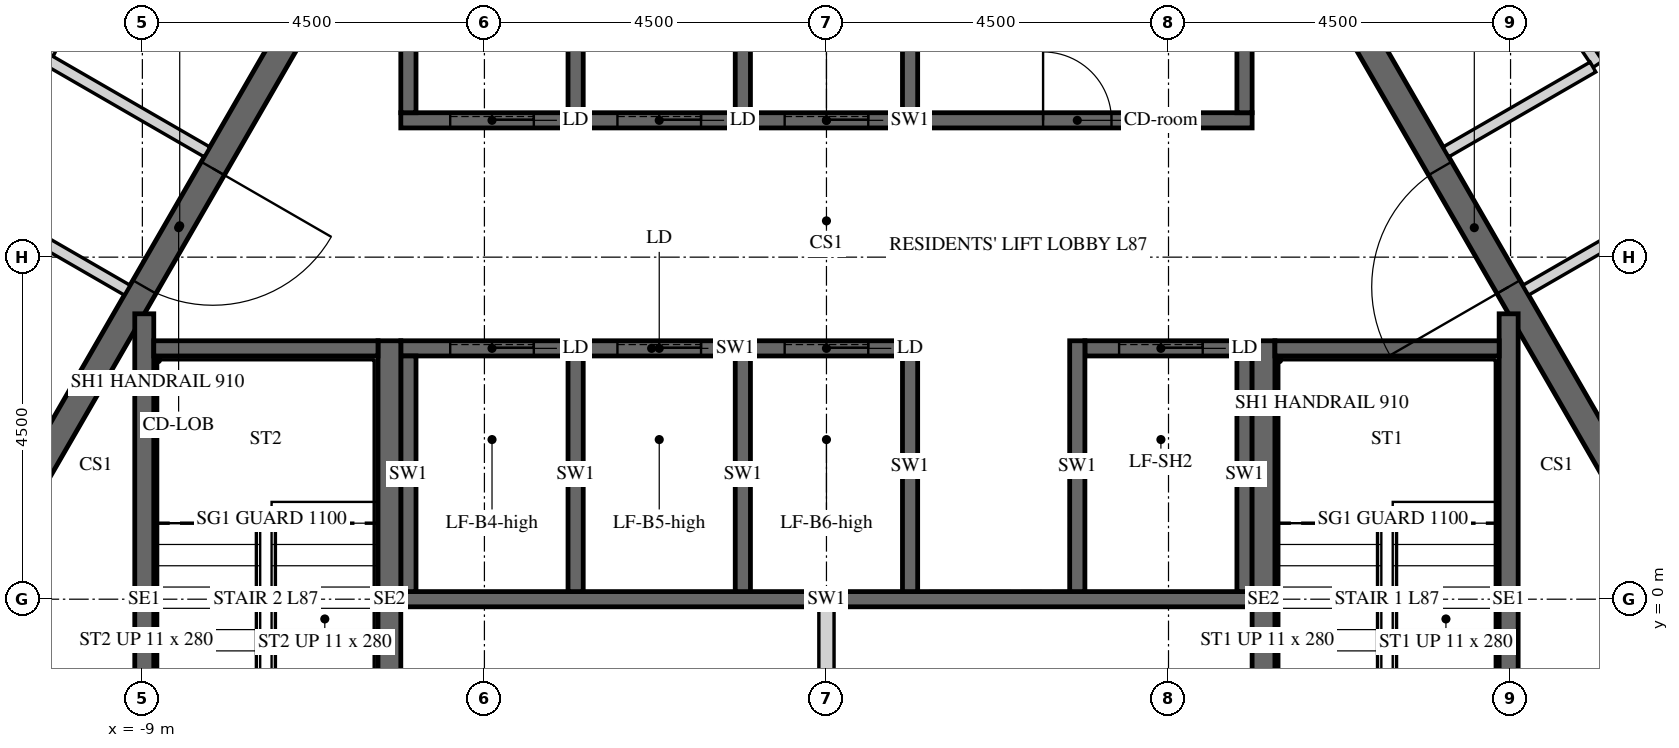
"""IFC4 building model, lengths in metres.
Left out: names, types, materials, properties, quantities, classifications, styles, units other than length and angle.
Written with IfcOpenShell. Run it as: python <this file> out.ifc"""

import sys

from ifc_helpers import new_model, si_unit, direction, frame, frame_2d, origin, place, context, subcontext, project, spatial, polyline, rectangle, outline, extrude, element, fill, save


model = new_model("IFC4")
c1 = context("Model", 3, precision=1e-05, world=origin(), true_north=direction((0.0, 1.0)))
c2 = subcontext(c1, "Body", "Model", "MODEL_VIEW")
j1 = project(units=[si_unit("LENGTHUNIT", "METRE"), si_unit("PLANEANGLEUNIT", "RADIAN")], contexts=[c1])
p1 = place(None, origin())
s1 = spatial("IfcSite", under=j1, at=p1, CompositionType="ELEMENT")
p2 = place(p1, origin())
s2 = spatial("IfcBuilding", under=s1, at=p2, CompositionType="ELEMENT")
p3 = place(p2, frame((0.0, 0.0, 361.2)))
s3 = spatial("IfcBuildingStorey", under=s2, at=p3, CompositionType="ELEMENT", Elevation=361.2)
p4 = place(p3, frame((-5.673, 9.825, -0.15), z_axis=(0.0, 0.0, 1.0), x_axis=(-0.499995046907, -0.866028263435, 0.0)))
e1 = element("IfcWall", 1, at=p4, inside=s3, PredefinedType="SHEAR", context=c2, shape_type="SweptSolid", body=[
    extrude(outline(polyline([(-0.101, -0.175), (11.446, -0.175), (11.244, 0.175), (0.101, 0.175), (-0.101, -0.175)])), origin(), (0.0, 0.0, 1.0), 3.9),
])
p5 = place(p4, frame((4.801, 0.0, 0.15)))
e2 = element("IfcOpeningElement", 2, at=p5, cuts=e1, PredefinedType="OPENING", context=c2, shape_type="SweptSolid", body=[
    extrude(rectangle(XDim=1.8, YDim=2.4, at=frame_2d((0.9, 1.2))), frame((0.0, 0.185, 0.0), z_axis=(0.0, -1.0, 0.0), x_axis=(1.0, 0.0, 0.0)), (0.0, 0.0, 1.0), 0.37),
])
p6 = place(p3, frame((-11.345, 0.0, -0.15), z_axis=(0.0, 0.0, 1.0), x_axis=(0.499995046907, -0.866028263435, 0.0)))
e3 = element("IfcWall", 3, at=p6, inside=s3, PredefinedType="SHEAR", context=c2, shape_type="SweptSolid", body=[
    extrude(outline(polyline([(-0.101, -0.175), (11.446, -0.175), (11.244, 0.175), (0.101, 0.175), (-0.101, -0.175)])), origin(), (0.0, 0.0, 1.0), 3.9),
])
p7 = place(p6, frame((4.744, 0.0, 0.15)))
e4 = element("IfcOpeningElement", 4, at=p7, cuts=e3, PredefinedType="OPENING", context=c2, shape_type="SweptSolid", body=[
    extrude(rectangle(XDim=1.8, YDim=2.4, at=frame_2d((0.9, 1.2))), frame((0.0, 0.185, 0.0), z_axis=(0.0, -1.0, 0.0), x_axis=(1.0, 0.0, 0.0)), (0.0, 0.0, 1.0), 0.37),
])
p8 = place(p3, frame((5.673, -9.825, -0.15), z_axis=(0.0, 0.0, 1.0), x_axis=(0.499995046907, 0.866028263435, 0.0)))
e5 = element("IfcWall", 5, at=p8, inside=s3, PredefinedType="SHEAR", context=c2, shape_type="SweptSolid", body=[
    extrude(outline(polyline([(-0.101, -0.175), (11.446, -0.175), (11.244, 0.175), (0.101, 0.175), (-0.101, -0.175)])), origin(), (0.0, 0.0, 1.0), 3.9),
])
p9 = place(p8, frame((4.801, 0.0, 0.15)))
e6 = element("IfcOpeningElement", 6, at=p9, cuts=e5, PredefinedType="OPENING", context=c2, shape_type="SweptSolid", body=[
    extrude(rectangle(XDim=1.8, YDim=2.4, at=frame_2d((0.9, 1.2))), frame((0.0, 0.185, 0.0), z_axis=(0.0, -1.0, 0.0), x_axis=(1.0, 0.0, 0.0)), (0.0, 0.0, 1.0), 0.37),
])
p10 = place(p3, frame((11.345, 0.0, -0.15), z_axis=(0.0, 0.0, 1.0), x_axis=(-0.499995046907, 0.866028263435, 0.0)))
e7 = element("IfcWall", 7, at=p10, inside=s3, PredefinedType="SHEAR", context=c2, shape_type="SweptSolid", body=[
    extrude(outline(polyline([(-0.101, -0.175), (11.446, -0.175), (11.244, 0.175), (0.101, 0.175), (-0.101, -0.175)])), origin(), (0.0, 0.0, 1.0), 3.9),
])
p11 = place(p10, frame((4.744, 0.0, 0.15)))
e8 = element("IfcOpeningElement", 8, at=p11, cuts=e7, PredefinedType="OPENING", context=c2, shape_type="SweptSolid", body=[
    extrude(rectangle(XDim=1.8, YDim=2.4, at=frame_2d((0.9, 1.2))), frame((0.0, 0.185, 0.0), z_axis=(0.0, -1.0, 0.0), x_axis=(1.0, 0.0, 0.0)), (0.0, 0.0, 1.0), 0.37),
])
p12 = place(p3, frame((-5.6, 6.3, -0.25), z_axis=(0.0, 0.0, 1.0), x_axis=(1.0, 0.0, 0.0)))
e9 = element("IfcWall", 9, at=p12, inside=s3, PredefinedType="SHEAR", context=c2, shape_type="SweptSolid", body=[
    extrude(rectangle(XDim=11.2, YDim=0.2, at=frame_2d((5.6, 0.0))), origin(), (0.0, 0.0, 1.0), 3.9),
])
p13 = place(p12, frame((8.45, 0.0, 0.25)))
e10 = element("IfcOpeningElement", 10, at=p13, cuts=e9, PredefinedType="OPENING", context=c2, shape_type="SweptSolid", body=[
    extrude(rectangle(XDim=0.9, YDim=2.1, at=frame_2d((0.45, 1.05))), frame((0.0, 0.11, 0.0), z_axis=(0.0, -1.0, 0.0), x_axis=(1.0, 0.0, 0.0)), (0.0, 0.0, 1.0), 0.22),
])
p14 = place(p12, frame((0.65, 0.0, 0.25)))
e11 = element("IfcOpeningElement", 11, at=p14, cuts=e9, PredefinedType="OPENING", context=c2, shape_type="SweptSolid", body=[
    extrude(rectangle(XDim=1.1, YDim=2.1, at=frame_2d((0.55, 1.05))), frame((0.0, 0.11, 0.0), z_axis=(0.0, -1.0, 0.0), x_axis=(1.0, 0.0, 0.0)), (0.0, 0.0, 1.0), 0.22),
])
p15 = place(p12, frame((2.85, 0.0, 0.25)))
e12 = element("IfcOpeningElement", 12, at=p15, cuts=e9, PredefinedType="OPENING", context=c2, shape_type="SweptSolid", body=[
    extrude(rectangle(XDim=1.1, YDim=2.1, at=frame_2d((0.55, 1.05))), frame((0.0, 0.11, 0.0), z_axis=(0.0, -1.0, 0.0), x_axis=(1.0, 0.0, 0.0)), (0.0, 0.0, 1.0), 0.22),
])
p16 = place(p12, frame((5.05, 0.0, 0.25)))
e13 = element("IfcOpeningElement", 13, at=p16, cuts=e9, PredefinedType="OPENING", context=c2, shape_type="SweptSolid", body=[
    extrude(rectangle(XDim=1.1, YDim=2.1, at=frame_2d((0.55, 1.05))), frame((0.0, 0.11, 0.0), z_axis=(0.0, -1.0, 0.0), x_axis=(1.0, 0.0, 0.0)), (0.0, 0.0, 1.0), 0.22),
])
for number, where, z_axis, x_axis in (
    (14, (-5.5, 6.4, -0.25), (0.0, 0.0, 1.0), (0.0, 1.0, 0.0)),
    (15, (-3.3, 6.4, -0.25), (0.0, 0.0, 1.0), (0.0, 1.0, 0.0)),
    (16, (-1.1, 6.4, -0.25), (0.0, 0.0, 1.0), (0.0, 1.0, 0.0)),
    (17, (1.1, 6.4, -0.25), (0.0, 0.0, 1.0), (0.0, 1.0, 0.0)),
    (18, (5.5, 6.4, -0.25), (0.0, 0.0, 1.0), (0.0, 1.0, 0.0)),
):
    element("IfcWall", number, at=place(p3, frame(where, z_axis=z_axis, x_axis=x_axis)), inside=s3, PredefinedType="SHEAR", context=c2, shape_type="SweptSolid", body=[
        extrude(rectangle(XDim=2.9, YDim=0.2, at=frame_2d((1.45, 0.0))), origin(), (0.0, 0.0, 1.0), 3.9),
    ])
p17 = place(p3, frame((-5.6, 3.3, -0.25), z_axis=(0.0, 0.0, 1.0), x_axis=(1.0, 0.0, 0.0)))
e19 = element("IfcWall", 19, at=p17, inside=s3, PredefinedType="SHEAR", context=c2, shape_type="SweptSolid", body=[
    extrude(rectangle(XDim=6.6, YDim=0.2, at=frame_2d((3.3, 0.0))), origin(), (0.0, 0.0, 1.0), 3.9),
])
p18 = place(p17, frame((0.65, 0.0, 0.25)))
e20 = element("IfcOpeningElement", 20, at=p18, cuts=e19, PredefinedType="OPENING", context=c2, shape_type="SweptSolid", body=[
    extrude(rectangle(XDim=1.1, YDim=2.1, at=frame_2d((0.55, 1.05))), frame((0.0, 0.11, 0.0), z_axis=(0.0, -1.0, 0.0), x_axis=(1.0, 0.0, 0.0)), (0.0, 0.0, 1.0), 0.22),
])
p19 = place(p17, frame((2.85, 0.0, 0.25)))
e21 = element("IfcOpeningElement", 21, at=p19, cuts=e19, PredefinedType="OPENING", context=c2, shape_type="SweptSolid", body=[
    extrude(rectangle(XDim=1.1, YDim=2.1, at=frame_2d((0.55, 1.05))), frame((0.0, 0.11, 0.0), z_axis=(0.0, -1.0, 0.0), x_axis=(1.0, 0.0, 0.0)), (0.0, 0.0, 1.0), 0.22),
])
p20 = place(p17, frame((5.05, 0.0, 0.25)))
e22 = element("IfcOpeningElement", 22, at=p20, cuts=e19, PredefinedType="OPENING", context=c2, shape_type="SweptSolid", body=[
    extrude(rectangle(XDim=1.1, YDim=2.1, at=frame_2d((0.55, 1.05))), frame((0.0, 0.11, 0.0), z_axis=(0.0, -1.0, 0.0), x_axis=(1.0, 0.0, 0.0)), (0.0, 0.0, 1.0), 0.22),
])
p21 = place(p3, frame((3.4, 3.3, -0.25), z_axis=(0.0, 0.0, 1.0), x_axis=(1.0, 0.0, 0.0)))
e23 = element("IfcWall", 23, at=p21, inside=s3, PredefinedType="SHEAR", context=c2, shape_type="SweptSolid", body=[
    extrude(rectangle(XDim=2.2, YDim=0.2, at=frame_2d((1.1, 0.0))), origin(), (0.0, 0.0, 1.0), 3.9),
])
p22 = place(p21, frame((0.45, 0.0, 0.25)))
e24 = element("IfcOpeningElement", 24, at=p22, cuts=e23, PredefinedType="OPENING", context=c2, shape_type="SweptSolid", body=[
    extrude(rectangle(XDim=1.1, YDim=2.1, at=frame_2d((0.55, 1.05))), frame((0.0, 0.11, 0.0), z_axis=(0.0, -1.0, 0.0), x_axis=(1.0, 0.0, 0.0)), (0.0, 0.0, 1.0), 0.22),
])
p23 = place(p3, frame((-5.6, 0.0, -0.25), z_axis=(0.0, 0.0, 1.0), x_axis=(1.0, 0.0, 0.0)))
e25 = element("IfcWall", 25, at=p23, inside=s3, PredefinedType="SHEAR", context=c2, shape_type="SweptSolid", body=[
    extrude(rectangle(XDim=11.2, YDim=0.2, at=frame_2d((5.6, 0.0))), origin(), (0.0, 0.0, 1.0), 3.9),
])
for number, where, z_axis, x_axis in (
    (26, (-5.5, 0.1, -0.25), (0.0, 0.0, 1.0), (0.0, 1.0, 0.0)),
    (27, (-3.3, 0.1, -0.25), (0.0, 0.0, 1.0), (0.0, 1.0, 0.0)),
    (28, (-1.1, 0.1, -0.25), (0.0, 0.0, 1.0), (0.0, 1.0, 0.0)),
):
    element("IfcWall", number, at=place(p3, frame(where, z_axis=z_axis, x_axis=x_axis)), inside=s3, PredefinedType="SHEAR", context=c2, shape_type="SweptSolid", body=[
        extrude(rectangle(XDim=3.1, YDim=0.2, at=frame_2d((1.55, 0.0))), origin(), (0.0, 0.0, 1.0), 3.9),
    ])
for number, where, z_axis, x_axis in (
    (29, (1.1, 0.1, -0.25), (0.0, 0.0, 1.0), (0.0, 1.0, 0.0)),
    (30, (3.3, 0.1, -0.25), (0.0, 0.0, 1.0), (0.0, 1.0, 0.0)),
):
    element("IfcWall", number, at=place(p3, frame(where, z_axis=z_axis, x_axis=x_axis)), inside=s3, PredefinedType="SHEAR", context=c2, shape_type="SweptSolid", body=[
        extrude(rectangle(XDim=3.3, YDim=0.2, at=frame_2d((1.65, 0.0))), origin(), (0.0, 0.0, 1.0), 3.9),
    ])
p24 = place(p3, frame((5.5, 0.1, -0.25), z_axis=(0.0, 0.0, 1.0), x_axis=(0.0, 1.0, 0.0)))
e31 = element("IfcWall", 31, at=p24, inside=s3, PredefinedType="SHEAR", context=c2, shape_type="SweptSolid", body=[
    extrude(rectangle(XDim=3.1, YDim=0.2, at=frame_2d((1.55, 0.0))), origin(), (0.0, 0.0, 1.0), 3.9),
])
p25 = place(p3, frame((0.0, -6.2, 0.0), z_axis=(0.0, 0.0, 1.0), x_axis=(0.0, 1.0, 0.0)))
e32 = element("IfcWall", 32, at=p25, inside=s3, PredefinedType="PARTITIONING", context=c2, shape_type="SweptSolid", body=[
    extrude(rectangle(XDim=6.1, YDim=0.2, at=frame_2d((3.05, 0.0))), origin(), (0.0, 0.0, 1.0), 3.65),
])
p26 = place(p3, frame((5.75, -3.4, -0.25), z_axis=(0.0, 0.0, 1.0), x_axis=(0.0, 1.0, 0.0)))
e33 = element("IfcWall", 33, at=p26, inside=s3, PredefinedType="SHEAR", context=c2, shape_type="SweptSolid", body=[
    extrude(rectangle(XDim=6.8, YDim=0.3, at=frame_2d((3.4, 0.0))), origin(), (0.0, 0.0, 1.0), 3.9),
])
p27 = place(p3, frame((8.975, -3.755, -0.25), z_axis=(0.0, 0.0, 1.0), x_axis=(0.0, 1.0, 0.0)))
e34 = element("IfcWall", 34, at=p27, inside=s3, PredefinedType="SHEAR", context=c2, shape_type="SweptSolid", body=[
    extrude(rectangle(XDim=7.51, YDim=0.25, at=frame_2d((3.755, 0.0))), origin(), (0.0, 0.0, 1.0), 3.9),
])
p28 = place(p3, frame((5.9, 3.3, -0.25), z_axis=(0.0, 0.0, 1.0), x_axis=(1.0, 0.0, 0.0)))
e35 = element("IfcWall", 35, at=p28, inside=s3, PredefinedType="SHEAR", context=c2, shape_type="SweptSolid", body=[
    extrude(rectangle(XDim=2.95, YDim=0.2, at=frame_2d((1.475, 0.0))), origin(), (0.0, 0.0, 1.0), 3.9),
])
p29 = place(p3, frame((-5.75, -3.4, -0.25), z_axis=(0.0, 0.0, 1.0), x_axis=(0.0, 1.0, 0.0)))
e36 = element("IfcWall", 36, at=p29, inside=s3, PredefinedType="SHEAR", context=c2, shape_type="SweptSolid", body=[
    extrude(rectangle(XDim=6.8, YDim=0.3, at=frame_2d((3.4, 0.0))), origin(), (0.0, 0.0, 1.0), 3.9),
])
p30 = place(p3, frame((-8.975, -3.755, -0.25), z_axis=(0.0, 0.0, 1.0), x_axis=(0.0, 1.0, 0.0)))
e37 = element("IfcWall", 37, at=p30, inside=s3, PredefinedType="SHEAR", context=c2, shape_type="SweptSolid", body=[
    extrude(rectangle(XDim=7.51, YDim=0.25, at=frame_2d((3.755, 0.0))), origin(), (0.0, 0.0, 1.0), 3.9),
])
p31 = place(p3, frame((-8.85, 3.3, -0.25), z_axis=(0.0, 0.0, 1.0), x_axis=(1.0, 0.0, 0.0)))
e38 = element("IfcWall", 38, at=p31, inside=s3, PredefinedType="SHEAR", context=c2, shape_type="SweptSolid", body=[
    extrude(rectangle(XDim=2.95, YDim=0.2, at=frame_2d((1.475, 0.0))), origin(), (0.0, 0.0, 1.0), 3.9),
])
p32 = place(p3, frame((-7.903, 16.075, 0.0), z_axis=(0.0, 0.0, 1.0), x_axis=(-0.438364761272, -0.898797160696, 0.0)))
e39 = element("IfcWall", 39, at=p32, inside=s3, PredefinedType="PARTITIONING", context=c2, shape_type="SweptSolid", body=[
    extrude(rectangle(XDim=15.688, YDim=0.15, at=frame_2d((7.844, 0.0))), origin(), (0.0, 0.0, 1.0), 2.82),
])
p33 = place(p32, frame((5.042, 0.0, 0.0)))
e40 = element("IfcOpeningElement", 40, at=p33, cuts=e39, PredefinedType="OPENING", context=c2, shape_type="SweptSolid", body=[
    extrude(rectangle(XDim=1.0, YDim=2.1, at=frame_2d((0.5, 1.05))), frame((0.0, 0.085, 0.0), z_axis=(0.0, -1.0, 0.0), x_axis=(1.0, 0.0, 0.0)), (0.0, 0.0, 1.0), 0.17),
])
p34 = place(p3, frame((-11.131, 5.18, 0.0), z_axis=(0.0, 0.0, 1.0), x_axis=(0.866037886895, -0.499978377995, 0.0)))
e41 = element("IfcWall", 41, at=p34, inside=s3, PredefinedType="PARTITIONING", context=c2, shape_type="SweptSolid", body=[
    extrude(rectangle(XDim=2.229, YDim=0.15, at=frame_2d((1.115, 0.0))), origin(), (0.0, 0.0, 1.0), 2.82),
])
p35 = place(p3, frame((-8.15, 5.884, 0.0), z_axis=(0.0, 0.0, 1.0), x_axis=(-0.866009790468, 0.500027042082, 0.0)))
e42 = element("IfcWall", 42, at=p35, inside=s3, PredefinedType="PARTITIONING", context=c2, shape_type="SweptSolid", body=[
    extrude(rectangle(XDim=2.451, YDim=0.15, at=frame_2d((1.226, 0.0))), origin(), (0.0, 0.0, 1.0), 2.82),
])
p36 = place(p3, frame((-10.24, 7.178, 0.0), z_axis=(0.0, 0.0, 1.0), x_axis=(0.438356120288, 0.898801375058, 0.0)))
e43 = element("IfcWall", 43, at=p36, inside=s3, PredefinedType="PARTITIONING", context=c2, shape_type="SweptSolid", body=[
    extrude(rectangle(XDim=7.98, YDim=0.15, at=frame_2d((3.99, 0.0))), origin(), (0.0, 0.0, 1.0), 2.82),
])
p37 = place(p3, frame((17.873, -1.193, 0.0), z_axis=(0.0, 0.0, 1.0), x_axis=(-0.559188435605, 0.829040586151, 0.0)))
e44 = element("IfcWall", 44, at=p37, inside=s3, PredefinedType="PARTITIONING", context=c2, shape_type="SweptSolid", body=[
    extrude(rectangle(XDim=15.688, YDim=0.15, at=frame_2d((7.844, 0.0))), origin(), (0.0, 0.0, 1.0), 2.82),
])
p38 = place(p3, frame((9.2, 4.066, 0.0), z_axis=(0.0, 0.0, 1.0), x_axis=(0.866038240688, 0.499977765172, 0.0)))
e45 = element("IfcWall", 45, at=p38, inside=s3, PredefinedType="PARTITIONING", context=c2, shape_type="SweptSolid", body=[
    extrude(rectangle(XDim=2.456, YDim=0.15, at=frame_2d((1.228, 0.0))), origin(), (0.0, 0.0, 1.0), 2.82),
])
p39 = place(p3, frame((7.221, 11.38, 0.0), z_axis=(0.0, 0.0, 1.0), x_axis=(0.559200548931, -0.829032415576, 0.0)))
e46 = element("IfcWall", 46, at=p39, inside=s3, PredefinedType="PARTITIONING", context=c2, shape_type="SweptSolid", body=[
    extrude(rectangle(XDim=5.236, YDim=0.15, at=frame_2d((2.618, 0.0))), origin(), (0.0, 0.0, 1.0), 2.82),
])
p40 = place(p39, frame((2.168, 0.0, 0.0)))
e47 = element("IfcOpeningElement", 47, at=p40, cuts=e46, PredefinedType="OPENING", context=c2, shape_type="SweptSolid", body=[
    extrude(rectangle(XDim=0.9, YDim=2.1, at=frame_2d((0.45, 1.05))), frame((0.0, 0.085, 0.0), z_axis=(0.0, -1.0, 0.0), x_axis=(1.0, 0.0, 0.0)), (0.0, 0.0, 1.0), 0.17),
])
p41 = place(p3, frame((10.084, 7.001, 0.0), z_axis=(0.0, 0.0, 1.0), x_axis=(-0.865994457699, -0.500053596362, 0.0)))
e48 = element("IfcWall", 48, at=p41, inside=s3, PredefinedType="PARTITIONING", context=c2, shape_type="SweptSolid", body=[
    extrude(rectangle(XDim=2.234, YDim=0.15, at=frame_2d((1.117, 0.0))), origin(), (0.0, 0.0, 1.0), 2.82),
])
p42 = place(p5, origin())
e49 = element("IfcDoor", 49, at=p42, inside=s3, OperationType="DOUBLE_DOOR_SINGLE_SWING", PredefinedType="DOOR", context=c2, shape_type="SweptSolid", body=[
    extrude(rectangle(XDim=1.8, YDim=2.4, at=frame_2d((0.9, 1.2))), frame((0.0, 0.025, 0.0), z_axis=(0.0, -1.0, 0.0), x_axis=(1.0, 0.0, 0.0)), (0.0, 0.0, 1.0), 0.05),
])
fill(e2, e49)
p43 = place(p11, origin())
e50 = element("IfcDoor", 50, at=p43, inside=s3, OperationType="DOUBLE_DOOR_SINGLE_SWING", PredefinedType="DOOR", context=c2, shape_type="SweptSolid", body=[
    extrude(rectangle(XDim=1.8, YDim=2.4, at=frame_2d((0.9, 1.2))), frame((0.0, 0.025, 0.0), z_axis=(0.0, -1.0, 0.0), x_axis=(1.0, 0.0, 0.0)), (0.0, 0.0, 1.0), 0.05),
])
fill(e8, e50)
p44 = place(p13, origin())
e51 = element("IfcDoor", 51, at=p44, inside=s3, OperationType="SINGLE_SWING_LEFT", PredefinedType="DOOR", context=c2, shape_type="SweptSolid", body=[
    extrude(rectangle(XDim=0.9, YDim=2.1, at=frame_2d((0.45, 1.05))), frame((0.0, 0.025, 0.0), z_axis=(0.0, -1.0, 0.0), x_axis=(1.0, 0.0, 0.0)), (0.0, 0.0, 1.0), 0.05),
])
fill(e10, e51)
p45 = place(p14, origin())
e52 = element("IfcDoor", 52, at=p45, inside=s3, OperationType="SLIDING_TO_LEFT", PredefinedType="DOOR", context=c2, shape_type="SweptSolid", body=[
    extrude(rectangle(XDim=1.1, YDim=2.1, at=frame_2d((0.55, 1.05))), frame((0.0, 0.025, 0.0), z_axis=(0.0, -1.0, 0.0), x_axis=(1.0, 0.0, 0.0)), (0.0, 0.0, 1.0), 0.05),
])
fill(e11, e52)
p46 = place(p15, origin())
e53 = element("IfcDoor", 53, at=p46, inside=s3, OperationType="SLIDING_TO_LEFT", PredefinedType="DOOR", context=c2, shape_type="SweptSolid", body=[
    extrude(rectangle(XDim=1.1, YDim=2.1, at=frame_2d((0.55, 1.05))), frame((0.0, 0.025, 0.0), z_axis=(0.0, -1.0, 0.0), x_axis=(1.0, 0.0, 0.0)), (0.0, 0.0, 1.0), 0.05),
])
fill(e12, e53)
p47 = place(p16, origin())
e54 = element("IfcDoor", 54, at=p47, inside=s3, OperationType="SLIDING_TO_LEFT", PredefinedType="DOOR", context=c2, shape_type="SweptSolid", body=[
    extrude(rectangle(XDim=1.1, YDim=2.1, at=frame_2d((0.55, 1.05))), frame((0.0, 0.025, 0.0), z_axis=(0.0, -1.0, 0.0), x_axis=(1.0, 0.0, 0.0)), (0.0, 0.0, 1.0), 0.05),
])
fill(e13, e54)
p48 = place(p18, origin())
e55 = element("IfcDoor", 55, at=p48, inside=s3, OperationType="SLIDING_TO_LEFT", PredefinedType="DOOR", context=c2, shape_type="SweptSolid", body=[
    extrude(rectangle(XDim=1.1, YDim=2.1, at=frame_2d((0.55, 1.05))), frame((0.0, 0.025, 0.0), z_axis=(0.0, -1.0, 0.0), x_axis=(1.0, 0.0, 0.0)), (0.0, 0.0, 1.0), 0.05),
])
fill(e20, e55)
p49 = place(p19, origin())
e56 = element("IfcDoor", 56, at=p49, inside=s3, OperationType="SLIDING_TO_LEFT", PredefinedType="DOOR", context=c2, shape_type="SweptSolid", body=[
    extrude(rectangle(XDim=1.1, YDim=2.1, at=frame_2d((0.55, 1.05))), frame((0.0, 0.025, 0.0), z_axis=(0.0, -1.0, 0.0), x_axis=(1.0, 0.0, 0.0)), (0.0, 0.0, 1.0), 0.05),
])
fill(e21, e56)
p50 = place(p20, origin())
e57 = element("IfcDoor", 57, at=p50, inside=s3, OperationType="SLIDING_TO_LEFT", PredefinedType="DOOR", context=c2, shape_type="SweptSolid", body=[
    extrude(rectangle(XDim=1.1, YDim=2.1, at=frame_2d((0.55, 1.05))), frame((0.0, 0.025, 0.0), z_axis=(0.0, -1.0, 0.0), x_axis=(1.0, 0.0, 0.0)), (0.0, 0.0, 1.0), 0.05),
])
fill(e22, e57)
p51 = place(p22, origin())
e58 = element("IfcDoor", 58, at=p51, inside=s3, OperationType="SLIDING_TO_LEFT", PredefinedType="DOOR", context=c2, shape_type="SweptSolid", body=[
    extrude(rectangle(XDim=1.1, YDim=2.1, at=frame_2d((0.55, 1.05))), frame((0.0, 0.025, 0.0), z_axis=(0.0, -1.0, 0.0), x_axis=(1.0, 0.0, 0.0)), (0.0, 0.0, 1.0), 0.05),
])
fill(e24, e58)
save(model, sys.argv[1])
